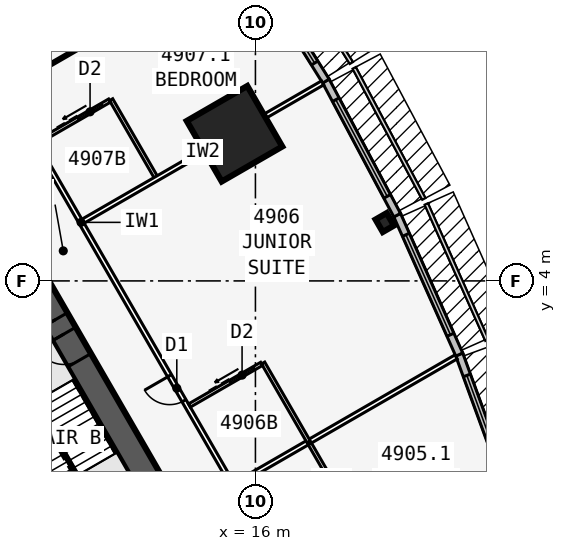
"""IFC4 building model, lengths in metres.
Left out: names, types, materials, properties, quantities, classifications, styles, units other than length and angle.
Written with IfcOpenShell. Run it as: python <this file> out.ifc"""

import sys

from ifc_helpers import new_model, si_unit, direction, frame, frame_2d, origin, origin_2d, place, context, subcontext, project, spatial, rectangle, i_section, extrude, element, fill, save


model = new_model("IFC4")
c1 = context("Model", 3, precision=1e-05, world=origin(), true_north=direction((0.0, 1.0)))
c2 = subcontext(c1, "Body", "Model", "MODEL_VIEW")
j1 = project(units=[si_unit("LENGTHUNIT", "METRE"), si_unit("PLANEANGLEUNIT", "RADIAN")], contexts=[c1])
p1 = place(None, origin())
s1 = spatial("IfcSite", under=j1, at=p1, CompositionType="ELEMENT")
p2 = place(p1, origin())
s2 = spatial("IfcBuilding", under=s1, at=p2, CompositionType="ELEMENT")
p3 = place(p2, frame((0.0, 0.0, 182.7)))
s3 = spatial("IfcBuildingStorey", under=s2, at=p3, CompositionType="ELEMENT", Elevation=182.7)
p4 = place(p3, frame((16.5, -9.526, 0.0), z_axis=(0.0, 0.0, 1.0), x_axis=(-0.499999749417, 0.866025548458, 0.0)))
e1 = element("IfcWall", 1, at=p4, inside=s3, PredefinedType="SHEAR", context=c2, shape_type="SweptSolid", body=[
    extrude(rectangle(XDim=33.0, YDim=0.9, at=frame_2d((16.5, 0.0))), origin(), (0.0, 0.0, 1.0), 3.4),
])
p5 = place(p4, frame((14.15, 0.0, 0.0)))
e2 = element("IfcOpeningElement", 2, at=p5, cuts=e1, PredefinedType="OPENING", context=c2, shape_type="SweptSolid", body=[
    extrude(rectangle(XDim=1.8, YDim=2.13, at=frame_2d((0.9, 1.065))), frame((0.0, 0.46, 0.0), z_axis=(0.0, -1.0, 0.0), x_axis=(1.0, 0.0, 0.0)), (0.0, 0.0, 1.0), 0.92),
])
p6 = place(p4, frame((12.6, 0.0, 0.0)))
e3 = element("IfcOpeningElement", 3, at=p6, cuts=e1, PredefinedType="OPENING", context=c2, shape_type="SweptSolid", body=[
    extrude(rectangle(XDim=1.0, YDim=2.13, at=frame_2d((0.5, 1.065))), frame((0.0, 0.46, 0.0), z_axis=(0.0, -1.0, 0.0), x_axis=(1.0, 0.0, 0.0)), (0.0, 0.0, 1.0), 0.92),
])
p7 = place(p3, frame((10.245, -5.843, 0.0), z_axis=(0.0, 0.0, 1.0), x_axis=(-0.499993009313, 0.866029439822, 0.0)))
e4 = element("IfcWall", 4, at=p7, inside=s3, PredefinedType="SOLIDWALL", context=c2, shape_type="SweptSolid", body=[
    extrude(rectangle(XDim=7.733, YDim=0.25, at=frame_2d((3.866, 0.0))), origin(), (0.0, 0.0, 1.0), 3.235),
])
p8 = place(p3, frame((20.254, 5.92, 0.0), z_axis=(0.0, 0.0, 1.0), x_axis=(0.866025403784, 0.5, 0.0)))
e5 = element("IfcColumn", 5, at=p8, inside=s3, PredefinedType="COLUMN", context=c2, shape_type="SweptSolid", body=[
    extrude(i_section(OverallWidth=0.424, OverallDepth=0.475, WebThickness=0.048, FlangeThickness=0.077, at=origin_2d()), origin(), (0.0, 0.0, 1.0), 3.4),
])
p9 = place(p3, frame((15.312, 8.84, 0.0), z_axis=(0.0, 0.0, 1.0), x_axis=(0.866025403784, 0.5, 0.0)))
e6 = element("IfcColumn", 6, at=p9, inside=s3, PredefinedType="COLUMN", context=c2, shape_type="SweptSolid", body=[
    extrude(rectangle(XDim=2.3, YDim=2.3, at=origin_2d()), origin(), (0.0, 0.0, 1.0), 3.4),
])
p10 = place(p3, frame((24.444, -3.183, 0.0), z_axis=(0.0, 0.0, 1.0), x_axis=(-0.343225593282, 0.939252996863, 0.0)))
e7 = element("IfcWall", 7, at=p10, inside=s3, PredefinedType="STANDARD", context=c2, shape_type="SweptSolid", body=[
    extrude(rectangle(XDim=5.076, YDim=0.25, at=frame_2d((2.538, 0.0))), origin(), (0.0, 0.0, 1.0), 3.235),
])
p11 = place(p10, frame((0.738, 0.0, 0.45)))
e8 = element("IfcOpeningElement", 8, at=p11, cuts=e7, PredefinedType="OPENING", context=c2, shape_type="SweptSolid", body=[
    extrude(rectangle(XDim=3.6, YDim=2.4, at=frame_2d((1.8, 1.2))), frame((0.0, 0.135, 0.0), z_axis=(0.0, -1.0, 0.0), x_axis=(1.0, 0.0, 0.0)), (0.0, 0.0, 1.0), 0.27),
])
p12 = place(p3, frame((22.705, 1.576, 0.0), z_axis=(0.0, 0.0, 1.0), x_axis=(-0.406832200364, 0.913502906808, 0.0)))
e9 = element("IfcWall", 9, at=p12, inside=s3, PredefinedType="STANDARD", context=c2, shape_type="SweptSolid", body=[
    extrude(rectangle(XDim=5.028, YDim=0.25, at=frame_2d((2.514, 0.0))), origin(), (0.0, 0.0, 1.0), 3.235),
])
p13 = place(p12, frame((0.714, 0.0, 0.45)))
e10 = element("IfcOpeningElement", 10, at=p13, cuts=e9, PredefinedType="OPENING", context=c2, shape_type="SweptSolid", body=[
    extrude(rectangle(XDim=3.6, YDim=2.4, at=frame_2d((1.8, 1.2))), frame((0.0, 0.135, 0.0), z_axis=(0.0, -1.0, 0.0), x_axis=(1.0, 0.0, 0.0)), (0.0, 0.0, 1.0), 0.27),
])
p14 = place(p3, frame((20.663, 6.161, 0.0), z_axis=(0.0, 0.0, 1.0), x_axis=(-0.469404966864, 0.882982999317, 0.0)))
e11 = element("IfcWall", 11, at=p14, inside=s3, PredefinedType="STANDARD", context=c2, shape_type="SweptSolid", body=[
    extrude(rectangle(XDim=5.003, YDim=0.25, at=frame_2d((2.501, 0.0))), origin(), (0.0, 0.0, 1.0), 3.235),
])
p15 = place(p14, frame((0.701, 0.0, 0.45)))
e12 = element("IfcOpeningElement", 12, at=p15, cuts=e11, PredefinedType="OPENING", context=c2, shape_type="SweptSolid", body=[
    extrude(rectangle(XDim=3.6, YDim=2.4, at=frame_2d((1.8, 1.2))), frame((0.0, 0.135, 0.0), z_axis=(0.0, -1.0, 0.0), x_axis=(1.0, 0.0, 0.0)), (0.0, 0.0, 1.0), 0.27),
])
p16 = place(p3, frame((18.319, 10.571, 0.0), z_axis=(0.0, 0.0, 1.0), x_axis=(-0.529990167382, 0.84800378683, 0.0)))
e13 = element("IfcWall", 13, at=p16, inside=s3, PredefinedType="STANDARD", context=c2, shape_type="SweptSolid", body=[
    extrude(rectangle(XDim=5.003, YDim=0.25, at=frame_2d((2.501, 0.0))), origin(), (0.0, 0.0, 1.0), 3.235),
])
p17 = place(p16, frame((0.701, 0.0, 0.45)))
e14 = element("IfcOpeningElement", 14, at=p17, cuts=e13, PredefinedType="OPENING", context=c2, shape_type="SweptSolid", body=[
    extrude(rectangle(XDim=3.6, YDim=2.4, at=frame_2d((1.8, 1.2))), frame((0.0, 0.135, 0.0), z_axis=(0.0, -1.0, 0.0), x_axis=(1.0, 0.0, 0.0)), (0.0, 0.0, 1.0), 0.27),
])
p18 = place(p3, frame((20.027, -10.985, 0.0), z_axis=(0.0, 0.0, 1.0), x_axis=(-0.500001677587, 0.866024435227, 0.0)))
e15 = element("IfcWall", 15, at=p18, inside=s3, PredefinedType="PARTITIONING", context=c2, shape_type="SweptSolid", body=[
    extrude(rectangle(XDim=39.054, YDim=0.15, at=frame_2d((19.527, 0.0))), origin(), (0.0, 0.0, 1.0), 3.235),
])
p19 = place(p18, frame((1.558, 0.0, 0.0)))
e16 = element("IfcOpeningElement", 16, at=p19, cuts=e15, PredefinedType="OPENING", context=c2, shape_type="SweptSolid", body=[
    extrude(rectangle(XDim=0.95, YDim=2.13, at=frame_2d((0.475, 1.065))), frame((0.0, 0.085, 0.0), z_axis=(0.0, -1.0, 0.0), x_axis=(1.0, 0.0, 0.0)), (0.0, 0.0, 1.0), 0.17),
])
p20 = place(p18, frame((12.752, 0.0, 0.0)))
e17 = element("IfcOpeningElement", 17, at=p20, cuts=e15, PredefinedType="OPENING", context=c2, shape_type="SweptSolid", body=[
    extrude(rectangle(XDim=0.95, YDim=2.13, at=frame_2d((0.475, 1.065))), frame((0.0, 0.085, 0.0), z_axis=(0.0, -1.0, 0.0), x_axis=(1.0, 0.0, 0.0)), (0.0, 0.0, 1.0), 0.17),
])
p21 = place(p18, frame((26.552, 0.0, 0.0)))
e18 = element("IfcOpeningElement", 18, at=p21, cuts=e15, PredefinedType="OPENING", context=c2, shape_type="SweptSolid", body=[
    extrude(rectangle(XDim=0.95, YDim=2.13, at=frame_2d((0.475, 1.065))), frame((0.0, 0.085, 0.0), z_axis=(0.0, -1.0, 0.0), x_axis=(1.0, 0.0, 0.0)), (0.0, 0.0, 1.0), 0.17),
])
p22 = place(p18, frame((37.752, 0.0, 0.0)))
e19 = element("IfcOpeningElement", 19, at=p22, cuts=e15, PredefinedType="OPENING", context=c2, shape_type="SweptSolid", body=[
    extrude(rectangle(XDim=0.95, YDim=2.13, at=frame_2d((0.475, 1.065))), frame((0.0, 0.085, 0.0), z_axis=(0.0, -1.0, 0.0), x_axis=(1.0, 0.0, 0.0)), (0.0, 0.0, 1.0), 0.17),
])
p23 = place(p3, frame((15.329, -2.697, 0.0), z_axis=(0.0, 0.0, 1.0), x_axis=(0.866024316602, 0.50000188305, 0.0)))
e20 = element("IfcWall", 20, at=p23, inside=s3, PredefinedType="PARTITIONING", context=c2, shape_type="SweptSolid", body=[
    extrude(rectangle(XDim=8.395, YDim=0.15, at=frame_2d((4.198, 0.0))), origin(), (0.0, 0.0, 1.0), 2.389),
])
p24 = place(p3, frame((10.329, 5.963, 0.0), z_axis=(0.0, 0.0, 1.0), x_axis=(0.866025170687, 0.500000403736, 0.0)))
e21 = element("IfcWall", 21, at=p24, inside=s3, PredefinedType="PARTITIONING", context=c2, shape_type="SweptSolid", body=[
    extrude(rectangle(XDim=9.099, YDim=0.15, at=frame_2d((4.549, 0.0))), origin(), (0.0, 0.0, 1.0), 2.389),
])
p25 = place(p3, frame((7.829, 10.293, 0.0), z_axis=(0.0, 0.0, 1.0), x_axis=(0.866027015393, 0.499997208602, 0.0)))
e22 = element("IfcWall", 22, at=p25, inside=s3, PredefinedType="PARTITIONING", context=c2, shape_type="SweptSolid", body=[
    extrude(rectangle(XDim=8.922, YDim=0.1, at=frame_2d((4.461, 0.0))), origin(), (0.0, 0.0, 1.0), 2.389),
])
p26 = place(p25, frame((0.45, 0.0, 0.0)))
e23 = element("IfcOpeningElement", 23, at=p26, cuts=e22, PredefinedType="OPENING", context=c2, shape_type="SweptSolid", body=[
    extrude(rectangle(XDim=0.9, YDim=2.13, at=frame_2d((0.45, 1.065))), frame((0.0, 0.06, 0.0), z_axis=(0.0, -1.0, 0.0), x_axis=(1.0, 0.0, 0.0)), (0.0, 0.0, 1.0), 0.12),
])
for number, where, z_axis, x_axis in (
    (24, (19.253, -3.895, 0.0), (0.0, 0.0, 1.0), (-0.5, 0.866, 0.0)),
    (25, (17.753, -1.297, 0.0), (0.0, 0.0, 1.0), (-0.5, 0.866, 0.0)),
):
    element("IfcWall", number, at=place(p3, frame(where, z_axis=z_axis, x_axis=x_axis)), inside=s3, PredefinedType="PLUMBINGWALL", context=c2, shape_type="SweptSolid", body=[
        extrude(rectangle(XDim=3.0, YDim=0.12, at=frame_2d((1.5, 0.0))), origin(), (0.0, 0.0, 1.0), 3.235),
    ])
p27 = place(p3, frame((13.829, -0.099, 0.0), z_axis=(0.0, 0.0, 1.0), x_axis=(0.865997131366, 0.500048966069, 0.0)))
e26 = element("IfcWall", 26, at=p27, inside=s3, PredefinedType="PLUMBINGWALL", context=c2, shape_type="SweptSolid", body=[
    extrude(rectangle(XDim=2.74, YDim=0.12, at=frame_2d((1.37, 0.0))), origin(), (0.0, 0.0, 1.0), 3.235),
])
p28 = place(p27, frame((1.55, 0.0, 0.0)))
e27 = element("IfcOpeningElement", 27, at=p28, cuts=e26, PredefinedType="OPENING", context=c2, shape_type="SweptSolid", body=[
    extrude(rectangle(XDim=0.9, YDim=2.13, at=frame_2d((0.45, 1.065))), frame((0.0, 0.07, 0.0), z_axis=(0.0, -1.0, 0.0), x_axis=(1.0, 0.0, 0.0)), (0.0, 0.0, 1.0), 0.14),
])
p29 = place(p3, frame((12.753, 7.363, 0.0), z_axis=(0.0, 0.0, 1.0), x_axis=(-0.499990139034, 0.866031096941, 0.0)))
e28 = element("IfcWall", 28, at=p29, inside=s3, PredefinedType="PLUMBINGWALL", context=c2, shape_type="SweptSolid", body=[
    extrude(rectangle(XDim=3.0, YDim=0.12, at=frame_2d((1.5, 0.0))), origin(), (0.0, 0.0, 1.0), 3.235),
])
p30 = place(p3, frame((8.829, 8.561, 0.0), z_axis=(0.0, 0.0, 1.0), x_axis=(0.866035715982, 0.499982138324, 0.0)))
e29 = element("IfcWall", 29, at=p30, inside=s3, PredefinedType="PLUMBINGWALL", context=c2, shape_type="SweptSolid", body=[
    extrude(rectangle(XDim=2.74, YDim=0.12, at=frame_2d((1.37, 0.0))), origin(), (0.0, 0.0, 1.0), 3.235),
])
p31 = place(p30, frame((1.55, 0.0, 0.0)))
e30 = element("IfcOpeningElement", 30, at=p31, cuts=e29, PredefinedType="OPENING", context=c2, shape_type="SweptSolid", body=[
    extrude(rectangle(XDim=0.9, YDim=2.13, at=frame_2d((0.45, 1.065))), frame((0.0, 0.07, 0.0), z_axis=(0.0, -1.0, 0.0), x_axis=(1.0, 0.0, 0.0)), (0.0, 0.0, 1.0), 0.14),
])
p32 = place(p3, frame((10.135, -2.401, 0.0), z_axis=(0.0, 0.0, 1.0), x_axis=(-0.499992232847, 0.866029888106, 0.0)))
e31 = element("IfcWall", 31, at=p32, inside=s3, PredefinedType="SOLIDWALL", context=c2, shape_type="SweptSolid", body=[
    extrude(rectangle(XDim=2.794, YDim=0.1, at=frame_2d((1.397, 0.0))), origin(), (0.0, 0.0, 1.0), 3.4),
])
p33 = place(p11, origin())
e32 = element("IfcWindow", 32, at=p33, inside=s3, PartitioningType="SINGLE_PANEL", PredefinedType="WINDOW", context=c2, shape_type="SweptSolid", body=[
    extrude(rectangle(XDim=3.6, YDim=2.4, at=frame_2d((1.8, 1.2))), frame((0.0, 0.03, 0.0), z_axis=(0.0, -1.0, 0.0), x_axis=(1.0, 0.0, 0.0)), (0.0, 0.0, 1.0), 0.06),
])
fill(e8, e32)
p34 = place(p13, origin())
e33 = element("IfcWindow", 33, at=p34, inside=s3, PartitioningType="SINGLE_PANEL", PredefinedType="WINDOW", context=c2, shape_type="SweptSolid", body=[
    extrude(rectangle(XDim=3.6, YDim=2.4, at=frame_2d((1.8, 1.2))), frame((0.0, 0.03, 0.0), z_axis=(0.0, -1.0, 0.0), x_axis=(1.0, 0.0, 0.0)), (0.0, 0.0, 1.0), 0.06),
])
fill(e10, e33)
p35 = place(p15, origin())
e34 = element("IfcWindow", 34, at=p35, inside=s3, PartitioningType="SINGLE_PANEL", PredefinedType="WINDOW", context=c2, shape_type="SweptSolid", body=[
    extrude(rectangle(XDim=3.6, YDim=2.4, at=frame_2d((1.8, 1.2))), frame((0.0, 0.03, 0.0), z_axis=(0.0, -1.0, 0.0), x_axis=(1.0, 0.0, 0.0)), (0.0, 0.0, 1.0), 0.06),
])
fill(e12, e34)
p36 = place(p17, origin())
e35 = element("IfcWindow", 35, at=p36, inside=s3, PartitioningType="SINGLE_PANEL", PredefinedType="WINDOW", context=c2, shape_type="SweptSolid", body=[
    extrude(rectangle(XDim=3.6, YDim=2.4, at=frame_2d((1.8, 1.2))), frame((0.0, 0.03, 0.0), z_axis=(0.0, -1.0, 0.0), x_axis=(1.0, 0.0, 0.0)), (0.0, 0.0, 1.0), 0.06),
])
fill(e14, e35)
p37 = place(p28, origin())
e36 = element("IfcDoor", 36, at=p37, inside=s3, OperationType="SLIDING_TO_LEFT", PredefinedType="DOOR", context=c2, shape_type="SweptSolid", body=[
    extrude(rectangle(XDim=0.9, YDim=2.13, at=frame_2d((0.45, 1.065))), frame((0.0, 0.025, 0.0), z_axis=(0.0, -1.0, 0.0), x_axis=(1.0, 0.0, 0.0)), (0.0, 0.0, 1.0), 0.05),
])
fill(e27, e36)
p38 = place(p20, origin())
e37 = element("IfcDoor", 37, at=p38, inside=s3, OperationType="SINGLE_SWING_RIGHT", PredefinedType="DOOR", context=c2, shape_type="SweptSolid", body=[
    extrude(rectangle(XDim=0.95, YDim=2.13, at=frame_2d((0.475, 1.065))), frame((0.0, 0.025, 0.0), z_axis=(0.0, -1.0, 0.0), x_axis=(1.0, 0.0, 0.0)), (0.0, 0.0, 1.0), 0.05),
])
fill(e17, e37)
p39 = place(p31, origin())
e38 = element("IfcDoor", 38, at=p39, inside=s3, OperationType="SLIDING_TO_LEFT", PredefinedType="DOOR", context=c2, shape_type="SweptSolid", body=[
    extrude(rectangle(XDim=0.9, YDim=2.13, at=frame_2d((0.45, 1.065))), frame((0.0, 0.025, 0.0), z_axis=(0.0, -1.0, 0.0), x_axis=(1.0, 0.0, 0.0)), (0.0, 0.0, 1.0), 0.05),
])
fill(e30, e38)
p40 = place(p5, origin())
e39 = element("IfcDoor", 39, at=p40, inside=s3, OperationType="DOUBLE_DOOR_SINGLE_SWING", PredefinedType="DOOR", context=c2, shape_type="SweptSolid", body=[
    extrude(rectangle(XDim=1.8, YDim=2.13, at=frame_2d((0.9, 1.065))), frame((0.0, 0.025, 0.0), z_axis=(0.0, -1.0, 0.0), x_axis=(1.0, 0.0, 0.0)), (0.0, 0.0, 1.0), 0.05),
])
fill(e2, e39)
p41 = place(p6, origin())
e40 = element("IfcDoor", 40, at=p41, inside=s3, OperationType="SINGLE_SWING_RIGHT", PredefinedType="DOOR", context=c2, shape_type="SweptSolid", body=[
    extrude(rectangle(XDim=1.0, YDim=2.13, at=frame_2d((0.5, 1.065))), frame((0.0, 0.025, 0.0), z_axis=(0.0, -1.0, 0.0), x_axis=(1.0, 0.0, 0.0)), (0.0, 0.0, 1.0), 0.05),
])
fill(e3, e40)
save(model, sys.argv[1])
